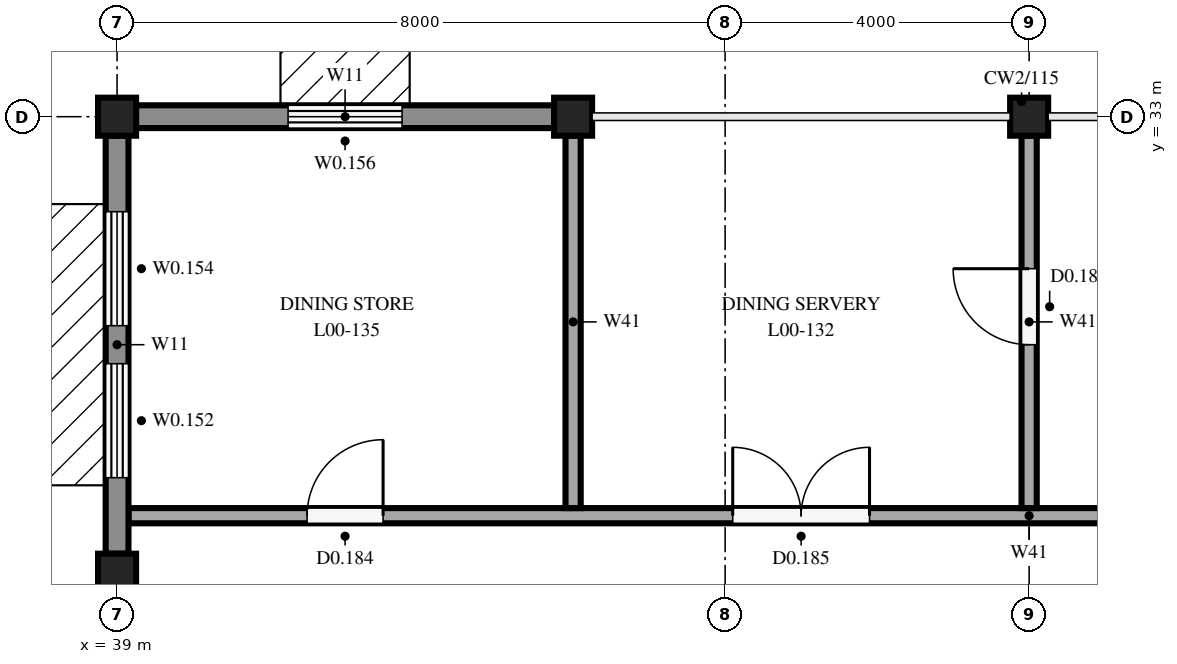
"""IFC4 building model, lengths in metres.
Left out: names, types, materials, properties, quantities, classifications, styles, units other than length and angle.
Written with IfcOpenShell. Run it as: python <this file> out.ifc"""

import sys

from ifc_helpers import new_model, si_unit, direction, frame, frame_2d, origin, origin_2d, place, context, subcontext, project, spatial, rectangle, extrude, element, fill, save


model = new_model("IFC4")
c1 = context("Model", 3, precision=1e-05, world=origin(), true_north=direction((0.0, 1.0)))
c2 = subcontext(c1, "Body", "Model", "MODEL_VIEW")
j1 = project(units=[si_unit("LENGTHUNIT", "METRE"), si_unit("PLANEANGLEUNIT", "RADIAN")], contexts=[c1])
p1 = place(None, origin())
s1 = spatial("IfcSite", under=j1, at=p1, CompositionType="ELEMENT")
p2 = place(p1, origin())
s2 = spatial("IfcBuilding", under=s1, at=p2, CompositionType="ELEMENT")
p3 = place(p2, origin())
s3 = spatial("IfcBuildingStorey", under=s2, at=p3, CompositionType="ELEMENT", Elevation=0.0)
for number, where, z_axis, x_axis in (
    (1, (39.0, 27.0, 0.0), (0.0, 0.0, 1.0), (1.0, 0.0, 0.0)),
    (2, (39.0, 33.0, 0.0), (0.0, 0.0, 1.0), (1.0, 0.0, 0.0)),
    (3, (45.0, 33.0, 0.0), (0.0, 0.0, 1.0), (1.0, 0.0, 0.0)),
    (4, (51.0, 33.0, 0.0), (0.0, 0.0, 1.0), (1.0, 0.0, 0.0)),
):
    element("IfcColumn", number, at=place(p3, frame(where, z_axis=z_axis, x_axis=x_axis)), inside=s3, PredefinedType="COLUMN", context=c2, shape_type="SweptSolid", body=[
        extrude(rectangle(XDim=0.5, YDim=0.5, at=origin_2d()), origin(), (0.0, 0.0, 1.0), 4.5),
    ])
p4 = place(p3, frame((39.0, 27.25, 0.0), z_axis=(0.0, 0.0, 1.0), x_axis=(0.0, 1.0, 0.0)))
e5 = element("IfcWall", 5, at=p4, inside=s3, PredefinedType="SOLIDWALL", context=c2, shape_type="SweptSolid", body=[
    extrude(rectangle(XDim=5.5, YDim=0.3, at=frame_2d((2.75, 0.0))), origin(), (0.0, 0.0, 1.0), 4.5),
])
p5 = place(p4, frame((1.0, 0.0, 0.6)))
e6 = element("IfcOpeningElement", 6, at=p5, cuts=e5, PredefinedType="OPENING", context=c2, shape_type="SweptSolid", body=[
    extrude(rectangle(XDim=1.5, YDim=3.4, at=frame_2d((0.75, 1.7))), frame((0.0, 0.16, 0.0), z_axis=(0.0, -1.0, 0.0), x_axis=(1.0, 0.0, 0.0)), (0.0, 0.0, 1.0), 0.32),
])
p6 = place(p4, frame((3.0, 0.0, 0.6)))
e7 = element("IfcOpeningElement", 7, at=p6, cuts=e5, PredefinedType="OPENING", context=c2, shape_type="SweptSolid", body=[
    extrude(rectangle(XDim=1.5, YDim=3.4, at=frame_2d((0.75, 1.7))), frame((0.0, 0.16, 0.0), z_axis=(0.0, -1.0, 0.0), x_axis=(1.0, 0.0, 0.0)), (0.0, 0.0, 1.0), 0.32),
])
p7 = place(p3, frame((39.25, 33.0, 0.0), z_axis=(0.0, 0.0, 1.0), x_axis=(1.0, 0.0, 0.0)))
e8 = element("IfcWall", 8, at=p7, inside=s3, PredefinedType="SOLIDWALL", context=c2, shape_type="SweptSolid", body=[
    extrude(rectangle(XDim=5.5, YDim=0.3, at=frame_2d((2.75, 0.0))), origin(), (0.0, 0.0, 1.0), 4.5),
])
p8 = place(p7, frame((2.0, 0.0, 1.0)))
e9 = element("IfcOpeningElement", 9, at=p8, cuts=e8, PredefinedType="OPENING", context=c2, shape_type="SweptSolid", body=[
    extrude(rectangle(XDim=1.5, YDim=1.8, at=frame_2d((0.75, 0.9))), frame((0.0, 0.16, 0.0), z_axis=(0.0, -1.0, 0.0), x_axis=(1.0, 0.0, 0.0)), (0.0, 0.0, 1.0), 0.32),
])
p9 = place(p3, frame((39.15, 27.75, 0.0), z_axis=(0.0, 0.0, 1.0), x_axis=(1.0, 0.0, 0.0)))
e10 = element("IfcWall", 10, at=p9, inside=s3, PredefinedType="PARTITIONING", context=c2, shape_type="SweptSolid", body=[
    extrude(rectangle(XDim=23.7, YDim=0.2, at=frame_2d((11.85, 0.0))), origin(), (0.0, 0.0, 1.0), 5.4),
])
p10 = place(p9, frame((2.35, 0.0, 0.0)))
e11 = element("IfcOpeningElement", 11, at=p10, cuts=e10, PredefinedType="OPENING", context=c2, shape_type="SweptSolid", body=[
    extrude(rectangle(XDim=1.0, YDim=2.1, at=frame_2d((0.5, 1.05))), frame((0.0, 0.11, 0.0), z_axis=(0.0, -1.0, 0.0), x_axis=(1.0, 0.0, 0.0)), (0.0, 0.0, 1.0), 0.22),
])
p11 = place(p9, frame((7.95, 0.0, 0.0)))
e12 = element("IfcOpeningElement", 12, at=p11, cuts=e10, PredefinedType="OPENING", context=c2, shape_type="SweptSolid", body=[
    extrude(rectangle(XDim=1.8, YDim=2.1, at=frame_2d((0.9, 1.05))), frame((0.0, 0.11, 0.0), z_axis=(0.0, -1.0, 0.0), x_axis=(1.0, 0.0, 0.0)), (0.0, 0.0, 1.0), 0.22),
])
p12 = place(p9, frame((17.25, 0.0, 0.0)))
e13 = element("IfcOpeningElement", 13, at=p12, cuts=e10, PredefinedType="OPENING", context=c2, shape_type="SweptSolid", body=[
    extrude(rectangle(XDim=1.2, YDim=2.1, at=frame_2d((0.6, 1.05))), frame((0.0, 0.11, 0.0), z_axis=(0.0, -1.0, 0.0), x_axis=(1.0, 0.0, 0.0)), (0.0, 0.0, 1.0), 0.22),
])
p13 = place(p3, frame((45.0, 27.85, 0.0), z_axis=(0.0, 0.0, 1.0), x_axis=(0.0, 1.0, 0.0)))
e14 = element("IfcWall", 14, at=p13, inside=s3, PredefinedType="PARTITIONING", context=c2, shape_type="SweptSolid", body=[
    extrude(rectangle(XDim=4.9, YDim=0.2, at=frame_2d((2.45, 0.0))), origin(), (0.0, 0.0, 1.0), 5.4),
])
p14 = place(p3, frame((51.0, 27.85, 0.0), z_axis=(0.0, 0.0, 1.0), x_axis=(0.0, 1.0, 0.0)))
e15 = element("IfcWall", 15, at=p14, inside=s3, PredefinedType="PARTITIONING", context=c2, shape_type="SweptSolid", body=[
    extrude(rectangle(XDim=4.9, YDim=0.2, at=frame_2d((2.45, 0.0))), origin(), (0.0, 0.0, 1.0), 5.4),
])
p15 = place(p14, frame((2.15, 0.0, 0.0)))
e16 = element("IfcOpeningElement", 16, at=p15, cuts=e15, PredefinedType="OPENING", context=c2, shape_type="SweptSolid", body=[
    extrude(rectangle(XDim=1.0, YDim=2.1, at=frame_2d((0.5, 1.05))), frame((0.0, 0.11, 0.0), z_axis=(0.0, -1.0, 0.0), x_axis=(1.0, 0.0, 0.0)), (0.0, 0.0, 1.0), 0.22),
])
p16 = place(p5, origin())
e17 = element("IfcWindow", 17, at=p16, inside=s3, PartitioningType="SINGLE_PANEL", PredefinedType="WINDOW", context=c2, shape_type="SweptSolid", body=[
    extrude(rectangle(XDim=1.5, YDim=3.4, at=frame_2d((0.75, 1.7))), frame((0.0, 0.03, 0.0), z_axis=(0.0, -1.0, 0.0), x_axis=(1.0, 0.0, 0.0)), (0.0, 0.0, 1.0), 0.06),
])
fill(e6, e17)
p17 = place(p6, origin())
e18 = element("IfcWindow", 18, at=p17, inside=s3, PartitioningType="SINGLE_PANEL", PredefinedType="WINDOW", context=c2, shape_type="SweptSolid", body=[
    extrude(rectangle(XDim=1.5, YDim=3.4, at=frame_2d((0.75, 1.7))), frame((0.0, 0.03, 0.0), z_axis=(0.0, -1.0, 0.0), x_axis=(1.0, 0.0, 0.0)), (0.0, 0.0, 1.0), 0.06),
])
fill(e7, e18)
p18 = place(p8, origin())
e19 = element("IfcWindow", 19, at=p18, inside=s3, PartitioningType="SINGLE_PANEL", PredefinedType="WINDOW", context=c2, shape_type="SweptSolid", body=[
    extrude(rectangle(XDim=1.5, YDim=1.8, at=frame_2d((0.75, 0.9))), frame((0.0, 0.03, 0.0), z_axis=(0.0, -1.0, 0.0), x_axis=(1.0, 0.0, 0.0)), (0.0, 0.0, 1.0), 0.06),
])
fill(e9, e19)
p19 = place(p10, origin())
e20 = element("IfcDoor", 20, at=p19, inside=s3, OperationType="SINGLE_SWING_RIGHT", PredefinedType="NOTDEFINED", context=c2, shape_type="SweptSolid", body=[
    extrude(rectangle(XDim=1.0, YDim=2.1, at=frame_2d((0.5, 1.05))), frame((0.0, 0.025, 0.0), z_axis=(0.0, -1.0, 0.0), x_axis=(1.0, 0.0, 0.0)), (0.0, 0.0, 1.0), 0.05),
])
fill(e11, e20)
p20 = place(p11, origin())
e21 = element("IfcDoor", 21, at=p20, inside=s3, OperationType="DOUBLE_DOOR_SINGLE_SWING", PredefinedType="NOTDEFINED", context=c2, shape_type="SweptSolid", body=[
    extrude(rectangle(XDim=1.8, YDim=2.1, at=frame_2d((0.9, 1.05))), frame((0.0, 0.025, 0.0), z_axis=(0.0, -1.0, 0.0), x_axis=(1.0, 0.0, 0.0)), (0.0, 0.0, 1.0), 0.05),
])
fill(e12, e21)
p21 = place(p15, origin())
e22 = element("IfcDoor", 22, at=p21, inside=s3, OperationType="SINGLE_SWING_RIGHT", PredefinedType="NOTDEFINED", context=c2, shape_type="SweptSolid", body=[
    extrude(rectangle(XDim=1.0, YDim=2.1, at=frame_2d((0.5, 1.05))), frame((0.0, 0.025, 0.0), z_axis=(0.0, -1.0, 0.0), x_axis=(1.0, 0.0, 0.0)), (0.0, 0.0, 1.0), 0.05),
])
fill(e16, e22)
save(model, sys.argv[1])
